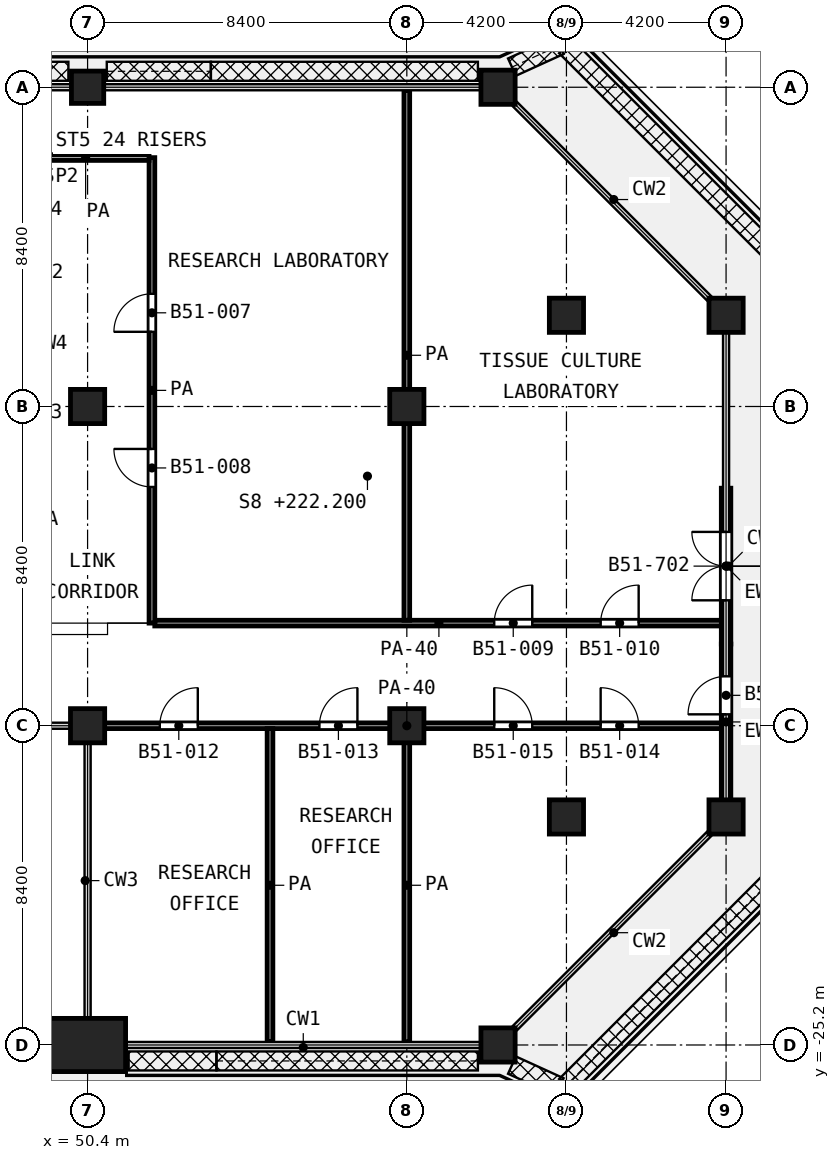
"""IFC4 building model, lengths in metres.
Left out: names, types, materials, properties, quantities, classifications, styles, units other than length and angle.
Written with IfcOpenShell. Run it as: python <this file> out.ifc"""

import sys

from ifc_helpers import new_model, si_unit, direction, frame, frame_2d, origin, origin_2d, place, context, subcontext, project, spatial, rectangle, extrude, element, fill, save


model = new_model("IFC4")
c1 = context("Model", 3, precision=1e-05, world=origin(), true_north=direction((0.0, 1.0)))
c2 = subcontext(c1, "Body", "Model", "MODEL_VIEW")
j1 = project(units=[si_unit("LENGTHUNIT", "METRE"), si_unit("PLANEANGLEUNIT", "RADIAN")], contexts=[c1])
p1 = place(None, origin())
s1 = spatial("IfcSite", under=j1, at=p1, CompositionType="ELEMENT")
p2 = place(p1, origin())
s2 = spatial("IfcBuilding", under=s1, at=p2, CompositionType="ELEMENT")
p3 = place(p2, frame((0.0, 0.0, 222.2)))
s3 = spatial("IfcBuildingStorey", under=s2, at=p3, CompositionType="ELEMENT", Elevation=222.2)
p4 = place(p3, frame((50.4, 0.0, 0.0), z_axis=(0.0, 0.0, 1.0), x_axis=(1.0, 0.0, 0.0)))
e1 = element("IfcColumn", 1, at=p4, inside=s3, PredefinedType="COLUMN", context=c2, shape_type="SweptSolid", body=[
    extrude(rectangle(XDim=0.85, YDim=0.85, at=origin_2d()), origin(), (0.0, 0.0, 1.0), 4.2),
])
for number, where, z_axis, x_axis in (
    (2, (61.2, 0.0, 0.0), (0.0, 0.0, 1.0), (1.0, 0.0, 0.0)),
    (3, (63.0, -6.0, 0.0), (0.0, 0.0, 1.0), (1.0, 0.0, 0.0)),
    (4, (67.2, -6.0, 0.0), (0.0, 0.0, 1.0), (1.0, 0.0, 0.0)),
    (5, (50.4, -8.4, 0.0), (0.0, 0.0, 1.0), (1.0, 0.0, 0.0)),
    (6, (58.8, -8.4, 0.0), (0.0, 0.0, 1.0), (1.0, 0.0, 0.0)),
    (7, (50.4, -16.8, 0.0), (0.0, 0.0, 1.0), (1.0, 0.0, 0.0)),
    (8, (58.8, -16.8, 0.0), (0.0, 0.0, 1.0), (1.0, 0.0, 0.0)),
    (9, (63.0, -19.2, 0.0), (0.0, 0.0, 1.0), (1.0, 0.0, 0.0)),
    (10, (67.2, -19.2, 0.0), (0.0, 0.0, 1.0), (1.0, 0.0, 0.0)),
):
    element("IfcColumn", number, at=place(p3, frame(where, z_axis=z_axis, x_axis=x_axis)), inside=s3, PredefinedType="COLUMN", context=c2, shape_type="SweptSolid", body=[
        extrude(rectangle(XDim=0.9, YDim=0.9, at=origin_2d()), origin(), (0.0, 0.0, 1.0), 4.2),
    ])
p5 = place(p3, frame((50.4, -25.2, 0.0), z_axis=(0.0, 0.0, 1.0), x_axis=(-1.0, 0.0, 0.0)))
e11 = element("IfcColumn", 11, at=p5, inside=s3, PredefinedType="COLUMN", context=c2, shape_type="SweptSolid", body=[
    extrude(rectangle(XDim=2.0, YDim=1.4, at=origin_2d()), origin(), (0.0, 0.0, 1.0), 4.2),
])
p6 = place(p3, frame((61.2, -25.2, 0.0), z_axis=(0.0, 0.0, 1.0), x_axis=(1.0, 0.0, 0.0)))
e12 = element("IfcColumn", 12, at=p6, inside=s3, PredefinedType="COLUMN", context=c2, shape_type="SweptSolid", body=[
    extrude(rectangle(XDim=0.9, YDim=0.9, at=origin_2d()), origin(), (0.0, 0.0, 1.0), 4.2),
])
p7 = place(p3, frame((67.2, -18.75, 0.0), z_axis=(0.0, 0.0, 1.0), x_axis=(0.0, 1.0, 0.0)))
e13 = element("IfcWall", 13, at=p7, inside=s3, PredefinedType="SOLIDWALL", context=c2, shape_type="SweptSolid", body=[
    extrude(rectangle(XDim=4.1, YDim=0.25, at=frame_2d((2.05, 0.0))), origin(), (0.0, 0.0, 1.0), 2.58),
])
p8 = place(p7, frame((2.25, 0.0, 0.0)))
e14 = element("IfcOpeningElement", 14, at=p8, cuts=e13, PredefinedType="OPENING", context=c2, shape_type="SweptSolid", body=[
    extrude(rectangle(XDim=1.0, YDim=2.1, at=frame_2d((0.5, 1.05))), frame((0.0, 0.135, 0.0), z_axis=(0.0, -1.0, 0.0), x_axis=(1.0, 0.0, 0.0)), (0.0, 0.0, 1.0), 0.27),
])
p9 = place(p3, frame((67.2, -14.65, 0.0), z_axis=(0.0, 0.0, 1.0), x_axis=(0.0, 1.0, 0.0)))
e15 = element("IfcWall", 15, at=p9, inside=s3, PredefinedType="SOLIDWALL", context=c2, shape_type="SweptSolid", body=[
    extrude(rectangle(XDim=4.1, YDim=0.25, at=frame_2d((2.05, 0.0))), origin(), (0.0, 0.0, 1.0), 2.58),
])
p10 = place(p9, frame((1.15, 0.0, 0.0)))
e16 = element("IfcOpeningElement", 16, at=p10, cuts=e15, PredefinedType="OPENING", context=c2, shape_type="SweptSolid", body=[
    extrude(rectangle(XDim=1.8, YDim=2.1, at=frame_2d((0.9, 1.05))), frame((0.0, 0.135, 0.0), z_axis=(0.0, -1.0, 0.0), x_axis=(1.0, 0.0, 0.0)), (0.0, 0.0, 1.0), 0.27),
])
p11 = place(p3, frame((50.48, -16.8, 0.0), z_axis=(0.0, 0.0, 1.0), x_axis=(1.0, 0.0, 0.0)))
e17 = element("IfcWall", 17, at=p11, inside=s3, PredefinedType="PARTITIONING", context=c2, shape_type="SweptSolid", body=[
    extrude(rectangle(XDim=16.64, YDim=0.15, at=frame_2d((8.32, 0.0))), origin(), (0.0, 0.0, 1.0), 2.7),
])
p12 = place(p11, frame((1.82, 0.0, 0.0)))
e18 = element("IfcOpeningElement", 18, at=p12, cuts=e17, PredefinedType="OPENING", context=c2, shape_type="SweptSolid", body=[
    extrude(rectangle(XDim=1.0, YDim=2.1, at=frame_2d((0.5, 1.05))), frame((0.0, 0.085, 0.0), z_axis=(0.0, -1.0, 0.0), x_axis=(1.0, 0.0, 0.0)), (0.0, 0.0, 1.0), 0.17),
])
p13 = place(p11, frame((6.02, 0.0, 0.0)))
e19 = element("IfcOpeningElement", 19, at=p13, cuts=e17, PredefinedType="OPENING", context=c2, shape_type="SweptSolid", body=[
    extrude(rectangle(XDim=1.0, YDim=2.1, at=frame_2d((0.5, 1.05))), frame((0.0, 0.085, 0.0), z_axis=(0.0, -1.0, 0.0), x_axis=(1.0, 0.0, 0.0)), (0.0, 0.0, 1.0), 0.17),
])
p14 = place(p11, frame((13.42, 0.0, 0.0)))
e20 = element("IfcOpeningElement", 20, at=p14, cuts=e17, PredefinedType="OPENING", context=c2, shape_type="SweptSolid", body=[
    extrude(rectangle(XDim=1.0, YDim=2.1, at=frame_2d((0.5, 1.05))), frame((0.0, 0.085, 0.0), z_axis=(0.0, -1.0, 0.0), x_axis=(1.0, 0.0, 0.0)), (0.0, 0.0, 1.0), 0.17),
])
p15 = place(p11, frame((10.62, 0.0, 0.0)))
e21 = element("IfcOpeningElement", 21, at=p15, cuts=e17, PredefinedType="OPENING", context=c2, shape_type="SweptSolid", body=[
    extrude(rectangle(XDim=1.0, YDim=2.1, at=frame_2d((0.5, 1.05))), frame((0.0, 0.085, 0.0), z_axis=(0.0, -1.0, 0.0), x_axis=(1.0, 0.0, 0.0)), (0.0, 0.0, 1.0), 0.17),
])
p16 = place(p3, frame((52.168, -14.1, 0.0), z_axis=(0.0, 0.0, 1.0), x_axis=(1.0, 0.0, 0.0)))
e22 = element("IfcWall", 22, at=p16, inside=s3, PredefinedType="PARTITIONING", context=c2, shape_type="SweptSolid", body=[
    extrude(rectangle(XDim=14.952, YDim=0.15, at=frame_2d((7.476, 0.0))), origin(), (0.0, 0.0, 1.0), 2.7),
])
p17 = place(p16, frame((8.932, 0.0, 0.0)))
e23 = element("IfcOpeningElement", 23, at=p17, cuts=e22, PredefinedType="OPENING", context=c2, shape_type="SweptSolid", body=[
    extrude(rectangle(XDim=1.0, YDim=2.1, at=frame_2d((0.5, 1.05))), frame((0.0, 0.085, 0.0), z_axis=(0.0, -1.0, 0.0), x_axis=(1.0, 0.0, 0.0)), (0.0, 0.0, 1.0), 0.17),
])
p18 = place(p16, frame((11.732, 0.0, 0.0)))
e24 = element("IfcOpeningElement", 24, at=p18, cuts=e22, PredefinedType="OPENING", context=c2, shape_type="SweptSolid", body=[
    extrude(rectangle(XDim=1.0, YDim=2.1, at=frame_2d((0.5, 1.05))), frame((0.0, 0.085, 0.0), z_axis=(0.0, -1.0, 0.0), x_axis=(1.0, 0.0, 0.0)), (0.0, 0.0, 1.0), 0.17),
])
p19 = place(p3, frame((48.68, -1.85, 0.0), z_axis=(0.0, 0.0, 1.0), x_axis=(1.0, 0.0, 0.0)))
e25 = element("IfcWall", 25, at=p19, inside=s3, PredefinedType="PARTITIONING", context=c2, shape_type="SweptSolid", body=[
    extrude(rectangle(XDim=3.337, YDim=0.15, at=frame_2d((1.668, 0.0))), origin(), (0.0, 0.0, 1.0), 3.6),
])
p20 = place(p3, frame((52.093, -14.1, 0.0), z_axis=(0.0, 0.0, 1.0), x_axis=(0.0, 1.0, 0.0)))
e26 = element("IfcWall", 26, at=p20, inside=s3, PredefinedType="PARTITIONING", context=c2, shape_type="SweptSolid", body=[
    extrude(rectangle(XDim=12.248, YDim=0.15, at=frame_2d((6.124, 0.0))), origin(), (0.0, 0.0, 1.0), 3.6),
])
p21 = place(p20, frame((7.665, 0.0, 0.0)))
e27 = element("IfcOpeningElement", 27, at=p21, cuts=e26, PredefinedType="OPENING", context=c2, shape_type="SweptSolid", body=[
    extrude(rectangle(XDim=1.0, YDim=2.1, at=frame_2d((0.5, 1.05))), frame((0.0, 0.085, 0.0), z_axis=(0.0, -1.0, 0.0), x_axis=(1.0, 0.0, 0.0)), (0.0, 0.0, 1.0), 0.17),
])
p22 = place(p20, frame((3.583, 0.0, 0.0)))
e28 = element("IfcOpeningElement", 28, at=p22, cuts=e26, PredefinedType="OPENING", context=c2, shape_type="SweptSolid", body=[
    extrude(rectangle(XDim=1.0, YDim=2.1, at=frame_2d((0.5, 1.05))), frame((0.0, 0.085, 0.0), z_axis=(0.0, -1.0, 0.0), x_axis=(1.0, 0.0, 0.0)), (0.0, 0.0, 1.0), 0.17),
])
for number, where, z_axis, x_axis in (
    (29, (55.2, -25.12, 0.0), (0.0, 0.0, 1.0), (0.0, 1.0, 0.0)),
    (30, (58.8, -25.12, 0.0), (0.0, 0.0, 1.0), (0.0, 1.0, 0.0)),
):
    element("IfcWall", number, at=place(p3, frame(where, z_axis=z_axis, x_axis=x_axis)), inside=s3, PredefinedType="PARTITIONING", context=c2, shape_type="SweptSolid", body=[
        extrude(rectangle(XDim=8.245, YDim=0.15, at=frame_2d((4.123, 0.0))), origin(), (0.0, 0.0, 1.0), 3.6),
    ])
p23 = place(p3, frame((58.8, -14.025, 0.0), z_axis=(0.0, 0.0, 1.0), x_axis=(0.0, 1.0, 0.0)))
e31 = element("IfcWall", 31, at=p23, inside=s3, PredefinedType="PARTITIONING", context=c2, shape_type="SweptSolid", body=[
    extrude(rectangle(XDim=13.945, YDim=0.15, at=frame_2d((6.972, 0.0))), origin(), (0.0, 0.0, 1.0), 3.6),
])
p24 = place(p8, origin())
e32 = element("IfcDoor", 32, at=p24, inside=s3, OperationType="SINGLE_SWING_LEFT", PredefinedType="DOOR", context=c2, shape_type="SweptSolid", body=[
    extrude(rectangle(XDim=1.0, YDim=2.1, at=frame_2d((0.5, 1.05))), frame((0.0, 0.025, 0.0), z_axis=(0.0, -1.0, 0.0), x_axis=(1.0, 0.0, 0.0)), (0.0, 0.0, 1.0), 0.05),
])
fill(e14, e32)
p25 = place(p10, origin())
e33 = element("IfcDoor", 33, at=p25, inside=s3, OperationType="DOUBLE_DOOR_SINGLE_SWING", PredefinedType="DOOR", context=c2, shape_type="SweptSolid", body=[
    extrude(rectangle(XDim=1.8, YDim=2.1, at=frame_2d((0.9, 1.05))), frame((0.0, 0.025, 0.0), z_axis=(0.0, -1.0, 0.0), x_axis=(1.0, 0.0, 0.0)), (0.0, 0.0, 1.0), 0.05),
])
fill(e16, e33)
p26 = place(p21, origin())
e34 = element("IfcDoor", 34, at=p26, inside=s3, OperationType="SINGLE_SWING_LEFT", PredefinedType="DOOR", context=c2, shape_type="SweptSolid", body=[
    extrude(rectangle(XDim=1.0, YDim=2.1, at=frame_2d((0.5, 1.05))), frame((0.0, 0.025, 0.0), z_axis=(0.0, -1.0, 0.0), x_axis=(1.0, 0.0, 0.0)), (0.0, 0.0, 1.0), 0.05),
])
fill(e27, e34)
p27 = place(p22, origin())
e35 = element("IfcDoor", 35, at=p27, inside=s3, OperationType="SINGLE_SWING_RIGHT", PredefinedType="DOOR", context=c2, shape_type="SweptSolid", body=[
    extrude(rectangle(XDim=1.0, YDim=2.1, at=frame_2d((0.5, 1.05))), frame((0.0, 0.025, 0.0), z_axis=(0.0, -1.0, 0.0), x_axis=(1.0, 0.0, 0.0)), (0.0, 0.0, 1.0), 0.05),
])
fill(e28, e35)
p28 = place(p17, origin())
e36 = element("IfcDoor", 36, at=p28, inside=s3, OperationType="SINGLE_SWING_RIGHT", PredefinedType="DOOR", context=c2, shape_type="SweptSolid", body=[
    extrude(rectangle(XDim=1.0, YDim=2.1, at=frame_2d((0.5, 1.05))), frame((0.0, 0.025, 0.0), z_axis=(0.0, -1.0, 0.0), x_axis=(1.0, 0.0, 0.0)), (0.0, 0.0, 1.0), 0.05),
])
fill(e23, e36)
p29 = place(p18, origin())
e37 = element("IfcDoor", 37, at=p29, inside=s3, OperationType="SINGLE_SWING_RIGHT", PredefinedType="DOOR", context=c2, shape_type="SweptSolid", body=[
    extrude(rectangle(XDim=1.0, YDim=2.1, at=frame_2d((0.5, 1.05))), frame((0.0, 0.025, 0.0), z_axis=(0.0, -1.0, 0.0), x_axis=(1.0, 0.0, 0.0)), (0.0, 0.0, 1.0), 0.05),
])
fill(e24, e37)
p30 = place(p12, origin())
e38 = element("IfcDoor", 38, at=p30, inside=s3, OperationType="SINGLE_SWING_RIGHT", PredefinedType="DOOR", context=c2, shape_type="SweptSolid", body=[
    extrude(rectangle(XDim=1.0, YDim=2.1, at=frame_2d((0.5, 1.05))), frame((0.0, 0.025, 0.0), z_axis=(0.0, -1.0, 0.0), x_axis=(1.0, 0.0, 0.0)), (0.0, 0.0, 1.0), 0.05),
])
fill(e18, e38)
p31 = place(p13, origin())
e39 = element("IfcDoor", 39, at=p31, inside=s3, OperationType="SINGLE_SWING_RIGHT", PredefinedType="DOOR", context=c2, shape_type="SweptSolid", body=[
    extrude(rectangle(XDim=1.0, YDim=2.1, at=frame_2d((0.5, 1.05))), frame((0.0, 0.025, 0.0), z_axis=(0.0, -1.0, 0.0), x_axis=(1.0, 0.0, 0.0)), (0.0, 0.0, 1.0), 0.05),
])
fill(e19, e39)
p32 = place(p14, origin())
e40 = element("IfcDoor", 40, at=p32, inside=s3, OperationType="SINGLE_SWING_LEFT", PredefinedType="DOOR", context=c2, shape_type="SweptSolid", body=[
    extrude(rectangle(XDim=1.0, YDim=2.1, at=frame_2d((0.5, 1.05))), frame((0.0, 0.025, 0.0), z_axis=(0.0, -1.0, 0.0), x_axis=(1.0, 0.0, 0.0)), (0.0, 0.0, 1.0), 0.05),
])
fill(e20, e40)
p33 = place(p15, origin())
e41 = element("IfcDoor", 41, at=p33, inside=s3, OperationType="SINGLE_SWING_LEFT", PredefinedType="DOOR", context=c2, shape_type="SweptSolid", body=[
    extrude(rectangle(XDim=1.0, YDim=2.1, at=frame_2d((0.5, 1.05))), frame((0.0, 0.025, 0.0), z_axis=(0.0, -1.0, 0.0), x_axis=(1.0, 0.0, 0.0)), (0.0, 0.0, 1.0), 0.05),
])
fill(e21, e41)
save(model, sys.argv[1])
